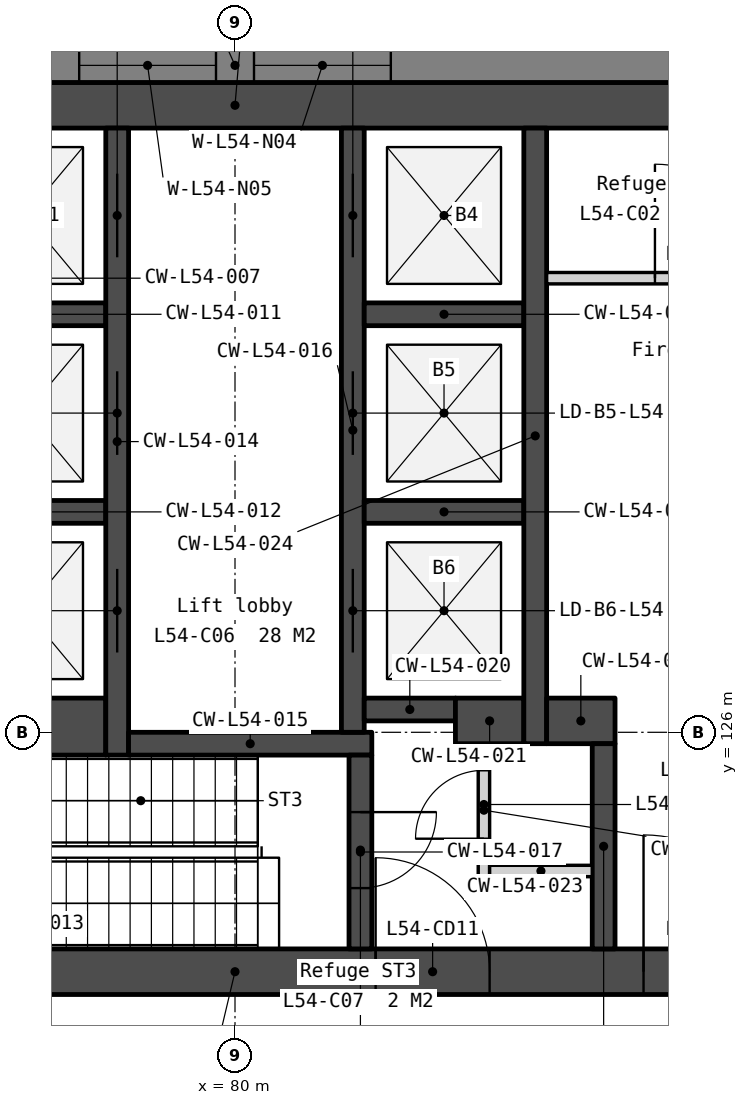
"""IFC4 building model, lengths in metres.
Left out: names, types, materials, properties, quantities, classifications, styles, units other than length and angle.
Written with IfcOpenShell. Run it as: python <this file> out.ifc"""

import sys

from ifc_helpers import new_model, si_unit, direction, frame, frame_2d, origin, place, context, subcontext, project, spatial, polyline, rectangle, outline, extrude, element, fill, save


model = new_model("IFC4")
c1 = context("Model", 3, precision=1e-05, world=origin(), true_north=direction((0.0, 1.0)))
c2 = subcontext(c1, "Body", "Model", "MODEL_VIEW")
j1 = project(units=[si_unit("LENGTHUNIT", "METRE"), si_unit("PLANEANGLEUNIT", "RADIAN")], contexts=[c1])
p1 = place(None, origin())
s1 = spatial("IfcSite", under=j1, at=p1, CompositionType="ELEMENT")
p2 = place(p1, origin())
s2 = spatial("IfcBuilding", under=s1, at=p2, CompositionType="ELEMENT")
p3 = place(p2, frame((0.0, 0.0, 215.3)))
s3 = spatial("IfcBuildingStorey", under=s2, at=p3, CompositionType="ELEMENT", Elevation=215.3)
p4 = place(p3, frame((69.0, 134.25, 0.0), z_axis=(0.0, 0.0, 1.0), x_axis=(1.0, 0.0, 0.0)))
e1 = element("IfcWall", 1, at=p4, inside=s3, PredefinedType="SOLIDWALL", context=c2, shape_type="SweptSolid", body=[
    extrude(rectangle(XDim=22.0, YDim=0.6, at=frame_2d((11.0, 0.0))), origin(), (0.0, 0.0, 1.0), 3.75),
])
p5 = place(p3, frame((69.0, 122.85, 0.0), z_axis=(0.0, 0.0, 1.0), x_axis=(1.0, 0.0, 0.0)))
e2 = element("IfcWall", 2, at=p5, inside=s3, PredefinedType="SOLIDWALL", context=c2, shape_type="SweptSolid", body=[
    extrude(rectangle(XDim=22.0, YDim=0.6, at=frame_2d((11.0, 0.0))), origin(), (0.0, 0.0, 1.0), 3.75),
])
p6 = place(p5, frame((16.375, 0.0, 0.0)))
e3 = element("IfcOpeningElement", 3, at=p6, cuts=e2, PredefinedType="OPENING", context=c2, shape_type="SweptSolid", body=[
    extrude(rectangle(XDim=1.8, YDim=2.1, at=frame_2d((0.9, 1.05))), frame((0.0, 0.31, 0.0), z_axis=(0.0, -1.0, 0.0), x_axis=(1.0, 0.0, 0.0)), (0.0, 0.0, 1.0), 0.62),
])
p7 = place(p5, frame((3.825, 0.0, 0.0)))
e4 = element("IfcOpeningElement", 4, at=p7, cuts=e2, PredefinedType="OPENING", context=c2, shape_type="SweptSolid", body=[
    extrude(rectangle(XDim=1.8, YDim=2.1, at=frame_2d((0.9, 1.05))), frame((0.0, 0.31, 0.0), z_axis=(0.0, -1.0, 0.0), x_axis=(1.0, 0.0, 0.0)), (0.0, 0.0, 1.0), 0.62),
])
p8 = place(p5, frame((12.85, 0.0, 0.0)))
e5 = element("IfcOpeningElement", 5, at=p8, cuts=e2, PredefinedType="OPENING", context=c2, shape_type="SweptSolid", body=[
    extrude(rectangle(XDim=1.5, YDim=2.1, at=frame_2d((0.75, 1.05))), frame((0.0, 0.31, 0.0), z_axis=(0.0, -1.0, 0.0), x_axis=(1.0, 0.0, 0.0)), (0.0, 0.0, 1.0), 0.62),
])
for number, where, z_axis, x_axis in (
    (6, (76.2, 131.5, 0.0), (0.0, 0.0, 1.0), (1.0, 0.0, 0.0)),
    (7, (76.2, 128.9, 0.0), (0.0, 0.0, 1.0), (1.0, 0.0, 0.0)),
):
    element("IfcWall", number, at=place(p3, frame(where, z_axis=z_axis, x_axis=x_axis)), inside=s3, PredefinedType="SOLIDWALL", context=c2, shape_type="SweptSolid", body=[
        extrude(rectangle(XDim=2.1, YDim=0.3, at=frame_2d((1.05, 0.0))), origin(), (0.0, 0.0, 1.0), 3.75),
    ])
p9 = place(p3, frame((76.2, 126.075, 0.0), z_axis=(0.0, 0.0, 1.0), x_axis=(1.0, 0.0, 0.0)))
e8 = element("IfcWall", 8, at=p9, inside=s3, PredefinedType="SOLIDWALL", context=c2, shape_type="SweptSolid", body=[
    extrude(rectangle(XDim=2.1, YDim=0.75, at=frame_2d((1.05, 0.0))), origin(), (0.0, 0.0, 1.0), 3.75),
])
p10 = place(p3, frame((78.45, 133.95, 0.0), z_axis=(0.0, 0.0, 1.0), x_axis=(0.0, -1.0, 0.0)))
e9 = element("IfcWall", 9, at=p10, inside=s3, PredefinedType="SOLIDWALL", context=c2, shape_type="SweptSolid", body=[
    extrude(rectangle(XDim=8.25, YDim=0.3, at=frame_2d((4.125, 0.0))), origin(), (0.0, 0.0, 1.0), 3.75),
])
p11 = place(p10, frame((0.6, 0.0, 0.0)))
e10 = element("IfcOpeningElement", 10, at=p11, cuts=e9, PredefinedType="OPENING", context=c2, shape_type="SweptSolid", body=[
    extrude(rectangle(XDim=1.1, YDim=2.1, at=frame_2d((0.55, 1.05))), frame((0.0, 0.16, 0.0), z_axis=(0.0, -1.0, 0.0), x_axis=(1.0, 0.0, 0.0)), (0.0, 0.0, 1.0), 0.32),
])
p12 = place(p10, frame((3.2, 0.0, 0.0)))
e11 = element("IfcOpeningElement", 11, at=p12, cuts=e9, PredefinedType="OPENING", context=c2, shape_type="SweptSolid", body=[
    extrude(rectangle(XDim=1.1, YDim=2.1, at=frame_2d((0.55, 1.05))), frame((0.0, 0.16, 0.0), z_axis=(0.0, -1.0, 0.0), x_axis=(1.0, 0.0, 0.0)), (0.0, 0.0, 1.0), 0.32),
])
p13 = place(p10, frame((5.8, 0.0, 0.0)))
e12 = element("IfcOpeningElement", 12, at=p13, cuts=e9, PredefinedType="OPENING", context=c2, shape_type="SweptSolid", body=[
    extrude(rectangle(XDim=1.1, YDim=2.1, at=frame_2d((0.55, 1.05))), frame((0.0, 0.16, 0.0), z_axis=(0.0, -1.0, 0.0), x_axis=(1.0, 0.0, 0.0)), (0.0, 0.0, 1.0), 0.32),
])
p14 = place(p3, frame((78.6, 125.85, 0.0), z_axis=(0.0, 0.0, 1.0), x_axis=(1.0, 0.0, 0.0)))
e13 = element("IfcWall", 13, at=p14, inside=s3, PredefinedType="SOLIDWALL", context=c2, shape_type="SweptSolid", body=[
    extrude(rectangle(XDim=3.2, YDim=0.3, at=frame_2d((1.6, 0.0))), origin(), (0.0, 0.0, 1.0), 3.75),
])
p15 = place(p3, frame((81.55, 133.95, 0.0), z_axis=(0.0, 0.0, 1.0), x_axis=(0.0, -1.0, 0.0)))
e14 = element("IfcWall", 14, at=p15, inside=s3, PredefinedType="SOLIDWALL", context=c2, shape_type="SweptSolid", body=[
    extrude(rectangle(XDim=7.95, YDim=0.3, at=frame_2d((3.975, 0.0))), origin(), (0.0, 0.0, 1.0), 3.75),
])
p16 = place(p15, frame((0.6, 0.0, 0.0)))
e15 = element("IfcOpeningElement", 15, at=p16, cuts=e14, PredefinedType="OPENING", context=c2, shape_type="SweptSolid", body=[
    extrude(rectangle(XDim=1.1, YDim=2.1, at=frame_2d((0.55, 1.05))), frame((0.0, 0.16, 0.0), z_axis=(0.0, -1.0, 0.0), x_axis=(1.0, 0.0, 0.0)), (0.0, 0.0, 1.0), 0.32),
])
p17 = place(p15, frame((3.2, 0.0, 0.0)))
e16 = element("IfcOpeningElement", 16, at=p17, cuts=e14, PredefinedType="OPENING", context=c2, shape_type="SweptSolid", body=[
    extrude(rectangle(XDim=1.1, YDim=2.1, at=frame_2d((0.55, 1.05))), frame((0.0, 0.16, 0.0), z_axis=(0.0, -1.0, 0.0), x_axis=(1.0, 0.0, 0.0)), (0.0, 0.0, 1.0), 0.32),
])
p18 = place(p15, frame((5.8, 0.0, 0.0)))
e17 = element("IfcOpeningElement", 17, at=p18, cuts=e14, PredefinedType="OPENING", context=c2, shape_type="SweptSolid", body=[
    extrude(rectangle(XDim=1.1, YDim=2.1, at=frame_2d((0.55, 1.05))), frame((0.0, 0.16, 0.0), z_axis=(0.0, -1.0, 0.0), x_axis=(1.0, 0.0, 0.0)), (0.0, 0.0, 1.0), 0.32),
])
p19 = place(p3, frame((81.65, 125.7, 0.0), z_axis=(0.0, 0.0, 1.0), x_axis=(0.0, -1.0, 0.0)))
e18 = element("IfcWall", 18, at=p19, inside=s3, PredefinedType="SOLIDWALL", context=c2, shape_type="SweptSolid", body=[
    extrude(rectangle(XDim=2.55, YDim=0.3, at=frame_2d((1.275, 0.0))), origin(), (0.0, 0.0, 1.0), 3.75),
])
p20 = place(p19, frame((0.75, 0.0, 0.0)))
e19 = element("IfcOpeningElement", 19, at=p20, cuts=e18, PredefinedType="OPENING", context=c2, shape_type="SweptSolid", body=[
    extrude(rectangle(XDim=1.0, YDim=2.1, at=frame_2d((0.5, 1.05))), frame((0.0, 0.16, 0.0), z_axis=(0.0, -1.0, 0.0), x_axis=(1.0, 0.0, 0.0)), (0.0, 0.0, 1.0), 0.32),
])
for number, where, z_axis, x_axis in (
    (20, (81.7, 131.5, 0.0), (0.0, 0.0, 1.0), (1.0, 0.0, 0.0)),
    (21, (81.7, 128.9, 0.0), (0.0, 0.0, 1.0), (1.0, 0.0, 0.0)),
):
    element("IfcWall", number, at=place(p3, frame(where, z_axis=z_axis, x_axis=x_axis)), inside=s3, PredefinedType="SOLIDWALL", context=c2, shape_type="SweptSolid", body=[
        extrude(rectangle(XDim=2.1, YDim=0.3, at=frame_2d((1.05, 0.0))), origin(), (0.0, 0.0, 1.0), 3.75),
    ])
p21 = place(p3, frame((81.7, 126.3, 0.0), z_axis=(0.0, 0.0, 1.0), x_axis=(1.0, 0.0, 0.0)))
e22 = element("IfcWall", 22, at=p21, inside=s3, PredefinedType="SOLIDWALL", context=c2, shape_type="SweptSolid", body=[
    extrude(rectangle(XDim=1.2, YDim=0.3, at=frame_2d((0.6, 0.0))), origin(), (0.0, 0.0, 1.0), 3.75),
])
p22 = place(p3, frame((82.9, 126.15, 0.0), z_axis=(0.0, 0.0, 1.0), x_axis=(1.0, 0.0, 0.0)))
e23 = element("IfcWall", 23, at=p22, inside=s3, PredefinedType="SOLIDWALL", context=c2, shape_type="SweptSolid", body=[
    extrude(rectangle(XDim=0.9, YDim=0.6, at=frame_2d((0.45, 0.0))), origin(), (0.0, 0.0, 1.0), 3.75),
])
p23 = place(p3, frame((83.275, 125.85, 0.0), z_axis=(0.0, 0.0, 1.0), x_axis=(0.0, -1.0, 0.0)))
e24 = element("IfcWall", 24, at=p23, inside=s3, PredefinedType="PARTITIONING", context=c2, shape_type="SweptSolid", body=[
    extrude(rectangle(XDim=1.75, YDim=0.15, at=frame_2d((0.875, 0.0))), origin(), (0.0, 0.0, 1.0), 3.75),
])
p24 = place(p23, frame((0.35, 0.0, 0.0)))
e25 = element("IfcOpeningElement", 25, at=p24, cuts=e24, PredefinedType="OPENING", context=c2, shape_type="SweptSolid", body=[
    extrude(rectangle(XDim=0.9, YDim=2.1, at=frame_2d((0.45, 1.05))), frame((0.0, 0.085, 0.0), z_axis=(0.0, -1.0, 0.0), x_axis=(1.0, 0.0, 0.0)), (0.0, 0.0, 1.0), 0.17),
])
p25 = place(p3, frame((83.35, 124.175, 0.0), z_axis=(0.0, 0.0, 1.0), x_axis=(1.0, 0.0, 0.0)))
e26 = element("IfcWall", 26, at=p25, inside=s3, PredefinedType="PARTITIONING", context=c2, shape_type="SweptSolid", body=[
    extrude(rectangle(XDim=1.35, YDim=0.15, at=frame_2d((0.675, 0.0))), origin(), (0.0, 0.0, 1.0), 3.75),
])
p26 = place(p3, frame((83.95, 133.95, 0.0), z_axis=(0.0, 0.0, 1.0), x_axis=(0.0, -1.0, 0.0)))
e27 = element("IfcWall", 27, at=p26, inside=s3, PredefinedType="SOLIDWALL", context=c2, shape_type="SweptSolid", body=[
    extrude(rectangle(XDim=8.1, YDim=0.3, at=frame_2d((4.05, 0.0))), origin(), (0.0, 0.0, 1.0), 3.75),
])
p27 = place(p3, frame((84.1, 131.975, 0.0), z_axis=(0.0, 0.0, 1.0), x_axis=(1.0, 0.0, 0.0)))
e28 = element("IfcWall", 28, at=p27, inside=s3, PredefinedType="PARTITIONING", context=c2, shape_type="SweptSolid", body=[
    extrude(rectangle(XDim=3.45, YDim=0.15, at=frame_2d((1.725, 0.0))), origin(), (0.0, 0.0, 1.0), 3.75),
])
p28 = place(p27, frame((1.425, 0.0, 0.0)))
e29 = element("IfcOpeningElement", 29, at=p28, cuts=e28, PredefinedType="OPENING", context=c2, shape_type="SweptSolid", body=[
    extrude(rectangle(XDim=1.5, YDim=2.1, at=frame_2d((0.75, 1.05))), frame((0.0, 0.085, 0.0), z_axis=(0.0, -1.0, 0.0), x_axis=(1.0, 0.0, 0.0)), (0.0, 0.0, 1.0), 0.17),
])
p29 = place(p3, frame((84.1, 126.15, 0.0), z_axis=(0.0, 0.0, 1.0), x_axis=(1.0, 0.0, 0.0)))
e30 = element("IfcWall", 30, at=p29, inside=s3, PredefinedType="SOLIDWALL", context=c2, shape_type="SweptSolid", body=[
    extrude(rectangle(XDim=0.9, YDim=0.6, at=frame_2d((0.45, 0.0))), origin(), (0.0, 0.0, 1.0), 3.75),
])
p30 = place(p3, frame((84.85, 125.85, 0.0), z_axis=(0.0, 0.0, 1.0), x_axis=(0.0, -1.0, 0.0)))
e31 = element("IfcWall", 31, at=p30, inside=s3, PredefinedType="SOLIDWALL", context=c2, shape_type="SweptSolid", body=[
    extrude(rectangle(XDim=2.7, YDim=0.3, at=frame_2d((1.35, 0.0))), origin(), (0.0, 0.0, 1.0), 3.75),
])
p31 = place(p3, frame((99.365, 134.775, -0.15), z_axis=(0.0, 0.0, 1.0), x_axis=(-1.0, 0.0, 0.0)))
e32 = element("IfcWall", 32, at=p31, inside=s3, PredefinedType="SOLIDWALL", context=c2, shape_type="SweptSolid", body=[
    extrude(outline(polyline([(38.729, 0.0), (38.729, 3.9), (0.0, 3.9), (0.0, 0.0), (38.729, 0.0)])), frame((0.0, 0.225, 0.0), z_axis=(0.0, -1.0, 0.0), x_axis=(1.0, 0.0, 0.0)), (0.0, 0.0, 1.0), 0.45),
])
p32 = place(p31, frame((0.776, 0.0, 0.95)))
e33 = element("IfcOpeningElement", 33, at=p32, cuts=e32, PredefinedType="OPENING", context=c2, shape_type="SweptSolid", body=[
    extrude(rectangle(XDim=1.2, YDim=2.2, at=frame_2d((0.6, 1.1))), frame((0.0, 0.235, 0.0), z_axis=(0.0, -1.0, 0.0), x_axis=(1.0, 0.0, 0.0)), (0.0, 0.0, 1.0), 0.47),
])
p33 = place(p31, frame((7.632, 0.0, 0.95)))
e34 = element("IfcOpeningElement", 34, at=p33, cuts=e32, PredefinedType="OPENING", context=c2, shape_type="SweptSolid", body=[
    extrude(rectangle(XDim=1.8, YDim=2.2, at=frame_2d((0.9, 1.1))), frame((0.0, 0.235, 0.0), z_axis=(0.0, -1.0, 0.0), x_axis=(1.0, 0.0, 0.0)), (0.0, 0.0, 1.0), 0.47),
])
p34 = place(p31, frame((9.932, 0.0, 0.95)))
e35 = element("IfcOpeningElement", 35, at=p34, cuts=e32, PredefinedType="OPENING", context=c2, shape_type="SweptSolid", body=[
    extrude(rectangle(XDim=1.8, YDim=2.2, at=frame_2d((0.9, 1.1))), frame((0.0, 0.235, 0.0), z_axis=(0.0, -1.0, 0.0), x_axis=(1.0, 0.0, 0.0)), (0.0, 0.0, 1.0), 0.47),
])
p35 = place(p31, frame((17.315, 0.0, 0.95)))
e36 = element("IfcOpeningElement", 36, at=p35, cuts=e32, PredefinedType="OPENING", context=c2, shape_type="SweptSolid", body=[
    extrude(rectangle(XDim=1.8, YDim=2.2, at=frame_2d((0.9, 1.1))), frame((0.0, 0.235, 0.0), z_axis=(0.0, -1.0, 0.0), x_axis=(1.0, 0.0, 0.0)), (0.0, 0.0, 1.0), 0.47),
])
p36 = place(p31, frame((19.615, 0.0, 0.95)))
e37 = element("IfcOpeningElement", 37, at=p36, cuts=e32, PredefinedType="OPENING", context=c2, shape_type="SweptSolid", body=[
    extrude(rectangle(XDim=1.8, YDim=2.2, at=frame_2d((0.9, 1.1))), frame((0.0, 0.235, 0.0), z_axis=(0.0, -1.0, 0.0), x_axis=(1.0, 0.0, 0.0)), (0.0, 0.0, 1.0), 0.47),
])
p37 = place(p31, frame((26.997, 0.0, 0.95)))
e38 = element("IfcOpeningElement", 38, at=p37, cuts=e32, PredefinedType="OPENING", context=c2, shape_type="SweptSolid", body=[
    extrude(rectangle(XDim=1.8, YDim=2.2, at=frame_2d((0.9, 1.1))), frame((0.0, 0.235, 0.0), z_axis=(0.0, -1.0, 0.0), x_axis=(1.0, 0.0, 0.0)), (0.0, 0.0, 1.0), 0.47),
])
p38 = place(p31, frame((29.297, 0.0, 0.95)))
e39 = element("IfcOpeningElement", 39, at=p38, cuts=e32, PredefinedType="OPENING", context=c2, shape_type="SweptSolid", body=[
    extrude(rectangle(XDim=1.8, YDim=2.2, at=frame_2d((0.9, 1.1))), frame((0.0, 0.235, 0.0), z_axis=(0.0, -1.0, 0.0), x_axis=(1.0, 0.0, 0.0)), (0.0, 0.0, 1.0), 0.47),
])
p39 = place(p31, frame((36.753, 0.0, 0.95)))
e40 = element("IfcOpeningElement", 40, at=p39, cuts=e32, PredefinedType="OPENING", context=c2, shape_type="SweptSolid", body=[
    extrude(rectangle(XDim=1.2, YDim=2.2, at=frame_2d((0.6, 1.1))), frame((0.0, 0.235, 0.0), z_axis=(0.0, -1.0, 0.0), x_axis=(1.0, 0.0, 0.0)), (0.0, 0.0, 1.0), 0.47),
])
p40 = place(p3, frame((59.13, 132.168, -0.15), z_axis=(0.0, 0.0, 1.0), x_axis=(0.500002199942, -0.866024133644, 0.0)))
e41 = element("IfcWall", 41, at=p40, inside=s3, PredefinedType="SOLIDWALL", context=c2, shape_type="SweptSolid", body=[
    extrude(outline(polyline([(38.729, 0.0), (38.729, 3.9), (0.0, 3.9), (0.0, 0.0), (38.729, 0.0)])), frame((0.0, 0.225, 0.0), z_axis=(0.0, -1.0, 0.0), x_axis=(1.0, 0.0, 0.0)), (0.0, 0.0, 1.0), 0.45),
])
p41 = place(p40, frame((0.776, 0.0, 0.95)))
e42 = element("IfcOpeningElement", 42, at=p41, cuts=e41, PredefinedType="OPENING", context=c2, shape_type="SweptSolid", body=[
    extrude(rectangle(XDim=1.2, YDim=2.2, at=frame_2d((0.6, 1.1))), frame((0.0, 0.235, 0.0), z_axis=(0.0, -1.0, 0.0), x_axis=(1.0, 0.0, 0.0)), (0.0, 0.0, 1.0), 0.47),
])
p42 = place(p40, frame((7.632, 0.0, 0.95)))
e43 = element("IfcOpeningElement", 43, at=p42, cuts=e41, PredefinedType="OPENING", context=c2, shape_type="SweptSolid", body=[
    extrude(rectangle(XDim=1.8, YDim=2.2, at=frame_2d((0.9, 1.1))), frame((0.0, 0.235, 0.0), z_axis=(0.0, -1.0, 0.0), x_axis=(1.0, 0.0, 0.0)), (0.0, 0.0, 1.0), 0.47),
])
p43 = place(p40, frame((9.932, 0.0, 0.95)))
e44 = element("IfcOpeningElement", 44, at=p43, cuts=e41, PredefinedType="OPENING", context=c2, shape_type="SweptSolid", body=[
    extrude(rectangle(XDim=1.8, YDim=2.2, at=frame_2d((0.9, 1.1))), frame((0.0, 0.235, 0.0), z_axis=(0.0, -1.0, 0.0), x_axis=(1.0, 0.0, 0.0)), (0.0, 0.0, 1.0), 0.47),
])
p44 = place(p40, frame((17.315, 0.0, 0.95)))
e45 = element("IfcOpeningElement", 45, at=p44, cuts=e41, PredefinedType="OPENING", context=c2, shape_type="SweptSolid", body=[
    extrude(rectangle(XDim=1.8, YDim=2.2, at=frame_2d((0.9, 1.1))), frame((0.0, 0.235, 0.0), z_axis=(0.0, -1.0, 0.0), x_axis=(1.0, 0.0, 0.0)), (0.0, 0.0, 1.0), 0.47),
])
p45 = place(p40, frame((19.615, 0.0, 0.95)))
e46 = element("IfcOpeningElement", 46, at=p45, cuts=e41, PredefinedType="OPENING", context=c2, shape_type="SweptSolid", body=[
    extrude(rectangle(XDim=1.8, YDim=2.2, at=frame_2d((0.9, 1.1))), frame((0.0, 0.235, 0.0), z_axis=(0.0, -1.0, 0.0), x_axis=(1.0, 0.0, 0.0)), (0.0, 0.0, 1.0), 0.47),
])
p46 = place(p40, frame((26.997, 0.0, 0.95)))
e47 = element("IfcOpeningElement", 47, at=p46, cuts=e41, PredefinedType="OPENING", context=c2, shape_type="SweptSolid", body=[
    extrude(rectangle(XDim=1.8, YDim=2.2, at=frame_2d((0.9, 1.1))), frame((0.0, 0.235, 0.0), z_axis=(0.0, -1.0, 0.0), x_axis=(1.0, 0.0, 0.0)), (0.0, 0.0, 1.0), 0.47),
])
p47 = place(p40, frame((29.297, 0.0, 0.95)))
e48 = element("IfcOpeningElement", 48, at=p47, cuts=e41, PredefinedType="OPENING", context=c2, shape_type="SweptSolid", body=[
    extrude(rectangle(XDim=1.8, YDim=2.2, at=frame_2d((0.9, 1.1))), frame((0.0, 0.235, 0.0), z_axis=(0.0, -1.0, 0.0), x_axis=(1.0, 0.0, 0.0)), (0.0, 0.0, 1.0), 0.47),
])
p48 = place(p40, frame((36.753, 0.0, 0.95)))
e49 = element("IfcOpeningElement", 49, at=p48, cuts=e41, PredefinedType="OPENING", context=c2, shape_type="SweptSolid", body=[
    extrude(rectangle(XDim=1.2, YDim=2.2, at=frame_2d((0.6, 1.1))), frame((0.0, 0.235, 0.0), z_axis=(0.0, -1.0, 0.0), x_axis=(1.0, 0.0, 0.0)), (0.0, 0.0, 1.0), 0.47),
])
p49 = place(p11, origin())
e50 = element("IfcDoor", 50, at=p49, inside=s3, OperationType="SLIDING_TO_RIGHT", PredefinedType="DOOR", context=c2, shape_type="SweptSolid", body=[
    extrude(rectangle(XDim=1.1, YDim=2.1, at=frame_2d((0.55, 1.05))), frame((0.0, 0.025, 0.0), z_axis=(0.0, -1.0, 0.0), x_axis=(1.0, 0.0, 0.0)), (0.0, 0.0, 1.0), 0.05),
])
fill(e10, e50)
p50 = place(p12, origin())
e51 = element("IfcDoor", 51, at=p50, inside=s3, OperationType="SLIDING_TO_RIGHT", PredefinedType="DOOR", context=c2, shape_type="SweptSolid", body=[
    extrude(rectangle(XDim=1.1, YDim=2.1, at=frame_2d((0.55, 1.05))), frame((0.0, 0.025, 0.0), z_axis=(0.0, -1.0, 0.0), x_axis=(1.0, 0.0, 0.0)), (0.0, 0.0, 1.0), 0.05),
])
fill(e11, e51)
p51 = place(p13, origin())
e52 = element("IfcDoor", 52, at=p51, inside=s3, OperationType="SLIDING_TO_RIGHT", PredefinedType="DOOR", context=c2, shape_type="SweptSolid", body=[
    extrude(rectangle(XDim=1.1, YDim=2.1, at=frame_2d((0.55, 1.05))), frame((0.0, 0.025, 0.0), z_axis=(0.0, -1.0, 0.0), x_axis=(1.0, 0.0, 0.0)), (0.0, 0.0, 1.0), 0.05),
])
fill(e12, e52)
p52 = place(p16, origin())
e53 = element("IfcDoor", 53, at=p52, inside=s3, OperationType="SLIDING_TO_LEFT", PredefinedType="DOOR", context=c2, shape_type="SweptSolid", body=[
    extrude(rectangle(XDim=1.1, YDim=2.1, at=frame_2d((0.55, 1.05))), frame((0.0, 0.025, 0.0), z_axis=(0.0, -1.0, 0.0), x_axis=(1.0, 0.0, 0.0)), (0.0, 0.0, 1.0), 0.05),
])
fill(e15, e53)
p53 = place(p17, origin())
e54 = element("IfcDoor", 54, at=p53, inside=s3, OperationType="SLIDING_TO_LEFT", PredefinedType="DOOR", context=c2, shape_type="SweptSolid", body=[
    extrude(rectangle(XDim=1.1, YDim=2.1, at=frame_2d((0.55, 1.05))), frame((0.0, 0.025, 0.0), z_axis=(0.0, -1.0, 0.0), x_axis=(1.0, 0.0, 0.0)), (0.0, 0.0, 1.0), 0.05),
])
fill(e16, e54)
p54 = place(p18, origin())
e55 = element("IfcDoor", 55, at=p54, inside=s3, OperationType="SLIDING_TO_LEFT", PredefinedType="DOOR", context=c2, shape_type="SweptSolid", body=[
    extrude(rectangle(XDim=1.1, YDim=2.1, at=frame_2d((0.55, 1.05))), frame((0.0, 0.025, 0.0), z_axis=(0.0, -1.0, 0.0), x_axis=(1.0, 0.0, 0.0)), (0.0, 0.0, 1.0), 0.05),
])
fill(e17, e55)
p55 = place(p6, origin())
e56 = element("IfcDoor", 56, at=p55, inside=s3, OperationType="DOUBLE_DOOR_DOUBLE_SWING", PredefinedType="DOOR", context=c2, shape_type="SweptSolid", body=[
    extrude(rectangle(XDim=1.8, YDim=2.1, at=frame_2d((0.9, 1.05))), frame((0.0, 0.025, 0.0), z_axis=(0.0, -1.0, 0.0), x_axis=(1.0, 0.0, 0.0)), (0.0, 0.0, 1.0), 0.05),
])
fill(e3, e56)
p56 = place(p8, origin())
e57 = element("IfcDoor", 57, at=p56, inside=s3, OperationType="DOUBLE_DOOR_DOUBLE_SWING", PredefinedType="DOOR", context=c2, shape_type="SweptSolid", body=[
    extrude(rectangle(XDim=1.5, YDim=2.1, at=frame_2d((0.75, 1.05))), frame((0.0, 0.025, 0.0), z_axis=(0.0, -1.0, 0.0), x_axis=(1.0, 0.0, 0.0)), (0.0, 0.0, 1.0), 0.05),
])
fill(e5, e57)
p57 = place(p24, origin())
e58 = element("IfcDoor", 58, at=p57, inside=s3, OperationType="SINGLE_SWING_RIGHT", PredefinedType="DOOR", context=c2, shape_type="SweptSolid", body=[
    extrude(rectangle(XDim=0.9, YDim=2.1, at=frame_2d((0.45, 1.05))), frame((0.0, 0.025, 0.0), z_axis=(0.0, -1.0, 0.0), x_axis=(1.0, 0.0, 0.0)), (0.0, 0.0, 1.0), 0.05),
])
fill(e25, e58)
p58 = place(p28, origin())
e59 = element("IfcDoor", 59, at=p58, inside=s3, OperationType="DOUBLE_DOOR_DOUBLE_SWING", PredefinedType="DOOR", context=c2, shape_type="SweptSolid", body=[
    extrude(rectangle(XDim=1.5, YDim=2.1, at=frame_2d((0.75, 1.05))), frame((0.0, 0.025, 0.0), z_axis=(0.0, -1.0, 0.0), x_axis=(1.0, 0.0, 0.0)), (0.0, 0.0, 1.0), 0.05),
])
fill(e29, e59)
p59 = place(p20, origin())
e60 = element("IfcDoor", 60, at=p59, inside=s3, OperationType="SINGLE_SWING_LEFT", PredefinedType="DOOR", context=c2, shape_type="SweptSolid", body=[
    extrude(rectangle(XDim=1.0, YDim=2.1, at=frame_2d((0.5, 1.05))), frame((0.0, 0.025, 0.0), z_axis=(0.0, -1.0, 0.0), x_axis=(1.0, 0.0, 0.0)), (0.0, 0.0, 1.0), 0.05),
])
fill(e19, e60)
p60 = place(p35, origin())
e61 = element("IfcWindow", 61, at=p60, inside=s3, PartitioningType="SINGLE_PANEL", PredefinedType="WINDOW", context=c2, shape_type="SweptSolid", body=[
    extrude(rectangle(XDim=1.8, YDim=2.2, at=frame_2d((0.9, 1.1))), frame((0.0, 0.03, 0.0), z_axis=(0.0, -1.0, 0.0), x_axis=(1.0, 0.0, 0.0)), (0.0, 0.0, 1.0), 0.06),
])
fill(e36, e61)
p61 = place(p36, origin())
e62 = element("IfcWindow", 62, at=p61, inside=s3, PartitioningType="SINGLE_PANEL", PredefinedType="WINDOW", context=c2, shape_type="SweptSolid", body=[
    extrude(rectangle(XDim=1.8, YDim=2.2, at=frame_2d((0.9, 1.1))), frame((0.0, 0.03, 0.0), z_axis=(0.0, -1.0, 0.0), x_axis=(1.0, 0.0, 0.0)), (0.0, 0.0, 1.0), 0.06),
])
fill(e37, e62)
save(model, sys.argv[1])
